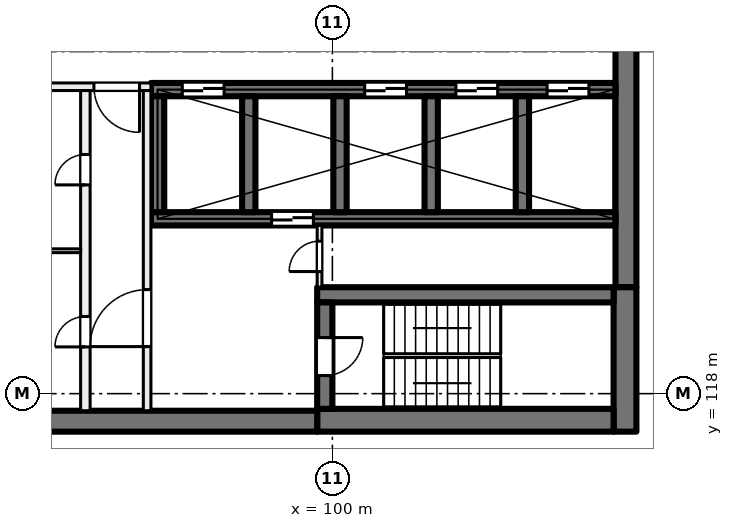
"""IFC4 building model, lengths in metres.
Left out: names, types, materials, properties, quantities, classifications, styles, units other than length and angle.
Written with IfcOpenShell. Run it as: python <this file> out.ifc"""

import sys

from ifc_helpers import new_model, si_unit, direction, frame, frame_2d, origin, place, context, subcontext, project, spatial, rectangle, extrude, element, fill, save


model = new_model("IFC4")
c1 = context("Model", 3, precision=1e-05, world=origin(), true_north=direction((0.0, 1.0)))
c2 = subcontext(c1, "Body", "Model", "MODEL_VIEW")
j1 = project(units=[si_unit("LENGTHUNIT", "METRE"), si_unit("PLANEANGLEUNIT", "RADIAN")], contexts=[c1])
p1 = place(None, origin())
s1 = spatial("IfcSite", under=j1, at=p1, CompositionType="ELEMENT")
p2 = place(p1, origin())
s2 = spatial("IfcBuilding", under=s1, at=p2, CompositionType="ELEMENT")
p3 = place(p2, frame((0.0, 0.0, 166.5)))
s3 = spatial("IfcBuildingStorey", under=s2, at=p3, CompositionType="ELEMENT", Elevation=166.5)
p4 = place(p3, frame((107.725, 135.2, 0.0), z_axis=(0.0, 0.0, 1.0), x_axis=(0.0, -1.0, 0.0)))
e1 = element("IfcWall", 1, at=p4, inside=s3, PredefinedType="SHEAR", context=c2, shape_type="SweptSolid", body=[
    extrude(rectangle(XDim=14.4, YDim=0.55, at=frame_2d((7.2, 0.0))), origin(), (0.0, 0.0, 1.0), 4.0),
])
p5 = place(p3, frame((107.7, 120.8, 0.0), z_axis=(0.0, 0.0, 1.0), x_axis=(0.0, -1.0, 0.0)))
e2 = element("IfcWall", 2, at=p5, inside=s3, PredefinedType="SHEAR", context=c2, shape_type="SweptSolid", body=[
    extrude(rectangle(XDim=3.8, YDim=0.6, at=frame_2d((1.9, 0.0))), origin(), (0.0, 0.0, 1.0), 4.0),
])
p6 = place(p3, frame((107.4, 117.3, 0.0), z_axis=(0.0, 0.0, 1.0), x_axis=(-1.0, 0.0, 0.0)))
e3 = element("IfcWall", 3, at=p6, inside=s3, PredefinedType="SHEAR", context=c2, shape_type="SweptSolid", body=[
    extrude(rectangle(XDim=7.8, YDim=0.6, at=frame_2d((3.9, 0.0))), origin(), (0.0, 0.0, 1.0), 4.0),
])
p7 = place(p3, frame((99.6, 117.275, 0.0), z_axis=(0.0, 0.0, 1.0), x_axis=(-1.0, 0.0, 0.0)))
e4 = element("IfcWall", 4, at=p7, inside=s3, PredefinedType="SHEAR", context=c2, shape_type="SweptSolid", body=[
    extrude(rectangle(XDim=8.95, YDim=0.55, at=frame_2d((4.475, 0.0))), origin(), (0.0, 0.0, 1.0), 4.0),
])
p8 = place(p3, frame((107.4, 120.6, 0.0), z_axis=(0.0, 0.0, 1.0), x_axis=(-1.0, 0.0, 0.0)))
e5 = element("IfcWall", 5, at=p8, inside=s3, PredefinedType="SHEAR", context=c2, shape_type="SweptSolid", body=[
    extrude(rectangle(XDim=7.8, YDim=0.4, at=frame_2d((3.9, 0.0))), origin(), (0.0, 0.0, 1.0), 4.0),
])
p9 = place(p3, frame((99.8, 120.4, 0.0), z_axis=(0.0, 0.0, 1.0), x_axis=(0.0, -1.0, 0.0)))
e6 = element("IfcWall", 6, at=p9, inside=s3, PredefinedType="SHEAR", context=c2, shape_type="SweptSolid", body=[
    extrude(rectangle(XDim=2.8, YDim=0.4, at=frame_2d((1.4, 0.0))), origin(), (0.0, 0.0, 1.0), 4.0),
])
p10 = place(p9, frame((0.925, 0.0, 0.0)))
e7 = element("IfcOpeningElement", 7, at=p10, cuts=e6, PredefinedType="OPENING", context=c2, shape_type="SweptSolid", body=[
    extrude(rectangle(XDim=1.0, YDim=2.1, at=frame_2d((0.5, 1.05))), frame((0.0, 0.21, 0.0), z_axis=(0.0, -1.0, 0.0), x_axis=(1.0, 0.0, 0.0)), (0.0, 0.0, 1.0), 0.42),
])
p11 = place(p3, frame((107.45, 126.0, 0.0), z_axis=(0.0, 0.0, 1.0), x_axis=(-1.0, 0.0, 0.0)))
e8 = element("IfcWall", 8, at=p11, inside=s3, PredefinedType="SHEAR", context=c2, shape_type="SweptSolid", body=[
    extrude(rectangle(XDim=12.225, YDim=0.35, at=frame_2d((6.112, 0.0))), origin(), (0.0, 0.0, 1.0), 4.0),
])
p12 = place(p11, frame((0.7, 0.0, 0.0)))
e9 = element("IfcOpeningElement", 9, at=p12, cuts=e8, PredefinedType="OPENING", context=c2, shape_type="SweptSolid", body=[
    extrude(rectangle(XDim=1.1, YDim=2.1, at=frame_2d((0.55, 1.05))), frame((0.0, 0.185, 0.0), z_axis=(0.0, -1.0, 0.0), x_axis=(1.0, 0.0, 0.0)), (0.0, 0.0, 1.0), 0.37),
])
p13 = place(p11, frame((3.1, 0.0, 0.0)))
e10 = element("IfcOpeningElement", 10, at=p13, cuts=e8, PredefinedType="OPENING", context=c2, shape_type="SweptSolid", body=[
    extrude(rectangle(XDim=1.1, YDim=2.1, at=frame_2d((0.55, 1.05))), frame((0.0, 0.185, 0.0), z_axis=(0.0, -1.0, 0.0), x_axis=(1.0, 0.0, 0.0)), (0.0, 0.0, 1.0), 0.37),
])
p14 = place(p11, frame((5.5, 0.0, 0.0)))
e11 = element("IfcOpeningElement", 11, at=p14, cuts=e8, PredefinedType="OPENING", context=c2, shape_type="SweptSolid", body=[
    extrude(rectangle(XDim=1.1, YDim=2.1, at=frame_2d((0.55, 1.05))), frame((0.0, 0.185, 0.0), z_axis=(0.0, -1.0, 0.0), x_axis=(1.0, 0.0, 0.0)), (0.0, 0.0, 1.0), 0.37),
])
p15 = place(p11, frame((10.3, 0.0, 0.0)))
e12 = element("IfcOpeningElement", 12, at=p15, cuts=e8, PredefinedType="OPENING", context=c2, shape_type="SweptSolid", body=[
    extrude(rectangle(XDim=1.1, YDim=2.1, at=frame_2d((0.55, 1.05))), frame((0.0, 0.185, 0.0), z_axis=(0.0, -1.0, 0.0), x_axis=(1.0, 0.0, 0.0)), (0.0, 0.0, 1.0), 0.37),
])
p16 = place(p3, frame((107.45, 122.6, 0.0), z_axis=(0.0, 0.0, 1.0), x_axis=(-1.0, 0.0, 0.0)))
e13 = element("IfcWall", 13, at=p16, inside=s3, PredefinedType="SHEAR", context=c2, shape_type="SweptSolid", body=[
    extrude(rectangle(XDim=12.225, YDim=0.35, at=frame_2d((6.112, 0.0))), origin(), (0.0, 0.0, 1.0), 4.0),
])
p17 = place(p16, frame((7.95, 0.0, 0.0)))
e14 = element("IfcOpeningElement", 14, at=p17, cuts=e13, PredefinedType="OPENING", context=c2, shape_type="SweptSolid", body=[
    extrude(rectangle(XDim=1.1, YDim=2.1, at=frame_2d((0.55, 1.05))), frame((0.0, 0.185, 0.0), z_axis=(0.0, -1.0, 0.0), x_axis=(1.0, 0.0, 0.0)), (0.0, 0.0, 1.0), 0.37),
])
for number, where, z_axis, x_axis in (
    (15, (105.0, 125.825, 0.0), (0.0, 0.0, 1.0), (0.0, -1.0, 0.0)),
    (16, (102.6, 125.825, 0.0), (0.0, 0.0, 1.0), (0.0, -1.0, 0.0)),
    (17, (100.2, 125.825, 0.0), (0.0, 0.0, 1.0), (0.0, -1.0, 0.0)),
    (18, (97.8, 125.825, 0.0), (0.0, 0.0, 1.0), (0.0, -1.0, 0.0)),
    (19, (95.4, 125.825, 0.0), (0.0, 0.0, 1.0), (0.0, -1.0, 0.0)),
):
    element("IfcWall", number, at=place(p3, frame(where, z_axis=z_axis, x_axis=x_axis)), inside=s3, PredefinedType="SHEAR", context=c2, shape_type="SweptSolid", body=[
        extrude(rectangle(XDim=3.05, YDim=0.35, at=frame_2d((1.525, 0.0))), origin(), (0.0, 0.0, 1.0), 4.0),
    ])
p18 = place(p3, frame((95.225, 126.075, 0.0), z_axis=(0.0, 0.0, 1.0), x_axis=(-1.0, 0.0, 0.0)))
e20 = element("IfcWall", 20, at=p18, inside=s3, PredefinedType="PARTITIONING", context=c2, shape_type="SweptSolid", body=[
    extrude(rectangle(XDim=3.875, YDim=0.2, at=frame_2d((1.938, 0.0))), origin(), (0.0, 0.0, 1.0), 3.625),
])
p19 = place(p18, frame((0.3, 0.0, 0.0)))
e21 = element("IfcOpeningElement", 21, at=p19, cuts=e20, PredefinedType="OPENING", context=c2, shape_type="SweptSolid", body=[
    extrude(rectangle(XDim=1.2, YDim=2.1, at=frame_2d((0.6, 1.05))), frame((0.0, 0.11, 0.0), z_axis=(0.0, -1.0, 0.0), x_axis=(1.0, 0.0, 0.0)), (0.0, 0.0, 1.0), 0.22),
])
p20 = place(p3, frame((95.125, 117.55, 0.0), z_axis=(0.0, 0.0, 1.0), x_axis=(0.0, 1.0, 0.0)))
e22 = element("IfcWall", 22, at=p20, inside=s3, PredefinedType="PARTITIONING", context=c2, shape_type="SweptSolid", body=[
    extrude(rectangle(XDim=8.425, YDim=0.2, at=frame_2d((4.212, 0.0))), origin(), (0.0, 0.0, 1.0), 3.625),
])
p21 = place(p20, frame((1.688, 0.0, 0.0)))
e23 = element("IfcOpeningElement", 23, at=p21, cuts=e22, PredefinedType="OPENING", context=c2, shape_type="SweptSolid", body=[
    extrude(rectangle(XDim=1.5, YDim=2.1, at=frame_2d((0.75, 1.05))), frame((0.0, 0.11, 0.0), z_axis=(0.0, -1.0, 0.0), x_axis=(1.0, 0.0, 0.0)), (0.0, 0.0, 1.0), 0.22),
])
p22 = place(p3, frame((93.5, 117.55, 0.0), z_axis=(0.0, 0.0, 1.0), x_axis=(0.0, 1.0, 0.0)))
e24 = element("IfcWall", 24, at=p22, inside=s3, PredefinedType="PARTITIONING", context=c2, shape_type="SweptSolid", body=[
    extrude(rectangle(XDim=8.425, YDim=0.25, at=frame_2d((4.212, 0.0))), origin(), (0.0, 0.0, 1.0), 3.625),
])
p23 = place(p22, frame((5.942, 0.0, 0.0)))
e25 = element("IfcOpeningElement", 25, at=p23, cuts=e24, PredefinedType="OPENING", context=c2, shape_type="SweptSolid", body=[
    extrude(rectangle(XDim=0.8, YDim=2.1, at=frame_2d((0.4, 1.05))), frame((0.0, 0.135, 0.0), z_axis=(0.0, -1.0, 0.0), x_axis=(1.0, 0.0, 0.0)), (0.0, 0.0, 1.0), 0.27),
])
p24 = place(p22, frame((1.68, 0.0, 0.0)))
e26 = element("IfcOpeningElement", 26, at=p24, cuts=e24, PredefinedType="OPENING", context=c2, shape_type="SweptSolid", body=[
    extrude(rectangle(XDim=0.8, YDim=2.1, at=frame_2d((0.4, 1.05))), frame((0.0, 0.135, 0.0), z_axis=(0.0, -1.0, 0.0), x_axis=(1.0, 0.0, 0.0)), (0.0, 0.0, 1.0), 0.27),
])
p25 = place(p3, frame((99.663, 120.8, 0.0), z_axis=(0.0, 0.0, 1.0), x_axis=(0.0, 1.0, 0.0)))
e27 = element("IfcWall", 27, at=p25, inside=s3, PredefinedType="PARTITIONING", context=c2, shape_type="SweptSolid", body=[
    extrude(rectangle(XDim=1.625, YDim=0.125, at=frame_2d((0.812, 0.0))), origin(), (0.0, 0.0, 1.0), 3.625),
])
p26 = place(p25, frame((0.413, 0.0, 0.0)))
e28 = element("IfcOpeningElement", 28, at=p26, cuts=e27, PredefinedType="OPENING", context=c2, shape_type="SweptSolid", body=[
    extrude(rectangle(XDim=0.8, YDim=2.1, at=frame_2d((0.4, 1.05))), frame((0.0, 0.073, 0.0), z_axis=(0.0, -1.0, 0.0), x_axis=(1.0, 0.0, 0.0)), (0.0, 0.0, 1.0), 0.145),
])
p27 = place(p3, frame((93.375, 121.76, 0.0), z_axis=(0.0, 0.0, 1.0), x_axis=(-1.0, 0.0, 0.0)))
e29 = element("IfcWall", 29, at=p27, inside=s3, PredefinedType="PARTITIONING", context=c2, shape_type="SweptSolid", body=[
    extrude(rectangle(XDim=2.025, YDim=0.1, at=frame_2d((1.012, 0.0))), origin(), (0.0, 0.0, 1.0), 3.625),
])
p28 = place(p12, origin())
e30 = element("IfcDoor", 30, at=p28, inside=s3, OperationType="DOUBLE_DOOR_SLIDING", PredefinedType="DOOR", context=c2, shape_type="SweptSolid", body=[
    extrude(rectangle(XDim=1.1, YDim=2.1, at=frame_2d((0.55, 1.05))), frame((0.0, 0.025, 0.0), z_axis=(0.0, -1.0, 0.0), x_axis=(1.0, 0.0, 0.0)), (0.0, 0.0, 1.0), 0.05),
])
fill(e9, e30)
p29 = place(p13, origin())
e31 = element("IfcDoor", 31, at=p29, inside=s3, OperationType="DOUBLE_DOOR_SLIDING", PredefinedType="DOOR", context=c2, shape_type="SweptSolid", body=[
    extrude(rectangle(XDim=1.1, YDim=2.1, at=frame_2d((0.55, 1.05))), frame((0.0, 0.025, 0.0), z_axis=(0.0, -1.0, 0.0), x_axis=(1.0, 0.0, 0.0)), (0.0, 0.0, 1.0), 0.05),
])
fill(e10, e31)
p30 = place(p14, origin())
e32 = element("IfcDoor", 32, at=p30, inside=s3, OperationType="DOUBLE_DOOR_SLIDING", PredefinedType="DOOR", context=c2, shape_type="SweptSolid", body=[
    extrude(rectangle(XDim=1.1, YDim=2.1, at=frame_2d((0.55, 1.05))), frame((0.0, 0.025, 0.0), z_axis=(0.0, -1.0, 0.0), x_axis=(1.0, 0.0, 0.0)), (0.0, 0.0, 1.0), 0.05),
])
fill(e11, e32)
p31 = place(p15, origin())
e33 = element("IfcDoor", 33, at=p31, inside=s3, OperationType="DOUBLE_DOOR_SLIDING", PredefinedType="DOOR", context=c2, shape_type="SweptSolid", body=[
    extrude(rectangle(XDim=1.1, YDim=2.1, at=frame_2d((0.55, 1.05))), frame((0.0, 0.025, 0.0), z_axis=(0.0, -1.0, 0.0), x_axis=(1.0, 0.0, 0.0)), (0.0, 0.0, 1.0), 0.05),
])
fill(e12, e33)
p32 = place(p19, origin())
e34 = element("IfcDoor", 34, at=p32, inside=s3, OperationType="DOUBLE_DOOR_SINGLE_SWING", PredefinedType="DOOR", context=c2, shape_type="SweptSolid", body=[
    extrude(rectangle(XDim=1.2, YDim=2.1, at=frame_2d((0.6, 1.05))), frame((0.0, 0.025, 0.0), z_axis=(0.0, -1.0, 0.0), x_axis=(1.0, 0.0, 0.0)), (0.0, 0.0, 1.0), 0.05),
])
fill(e21, e34)
p33 = place(p21, origin())
e35 = element("IfcDoor", 35, at=p33, inside=s3, OperationType="DOUBLE_DOOR_SINGLE_SWING", PredefinedType="DOOR", context=c2, shape_type="SweptSolid", body=[
    extrude(rectangle(XDim=1.5, YDim=2.1, at=frame_2d((0.75, 1.05))), frame((0.0, 0.025, 0.0), z_axis=(0.0, -1.0, 0.0), x_axis=(1.0, 0.0, 0.0)), (0.0, 0.0, 1.0), 0.05),
])
fill(e23, e35)
p34 = place(p10, origin())
e36 = element("IfcDoor", 36, at=p34, inside=s3, OperationType="SINGLE_SWING_LEFT", PredefinedType="DOOR", context=c2, shape_type="SweptSolid", body=[
    extrude(rectangle(XDim=1.0, YDim=2.1, at=frame_2d((0.5, 1.05))), frame((0.0, 0.025, 0.0), z_axis=(0.0, -1.0, 0.0), x_axis=(1.0, 0.0, 0.0)), (0.0, 0.0, 1.0), 0.05),
])
fill(e7, e36)
p35 = place(p26, origin())
e37 = element("IfcDoor", 37, at=p35, inside=s3, OperationType="SINGLE_SWING_RIGHT", PredefinedType="DOOR", context=c2, shape_type="SweptSolid", body=[
    extrude(rectangle(XDim=0.8, YDim=2.1, at=frame_2d((0.4, 1.05))), frame((0.0, 0.025, 0.0), z_axis=(0.0, -1.0, 0.0), x_axis=(1.0, 0.0, 0.0)), (0.0, 0.0, 1.0), 0.05),
])
fill(e28, e37)
p36 = place(p23, origin())
e38 = element("IfcDoor", 38, at=p36, inside=s3, OperationType="SINGLE_SWING_LEFT", PredefinedType="DOOR", context=c2, shape_type="SweptSolid", body=[
    extrude(rectangle(XDim=0.8, YDim=2.1, at=frame_2d((0.4, 1.05))), frame((0.0, 0.025, 0.0), z_axis=(0.0, -1.0, 0.0), x_axis=(1.0, 0.0, 0.0)), (0.0, 0.0, 1.0), 0.05),
])
fill(e25, e38)
p37 = place(p24, origin())
e39 = element("IfcDoor", 39, at=p37, inside=s3, OperationType="SINGLE_SWING_RIGHT", PredefinedType="DOOR", context=c2, shape_type="SweptSolid", body=[
    extrude(rectangle(XDim=0.8, YDim=2.1, at=frame_2d((0.4, 1.05))), frame((0.0, 0.025, 0.0), z_axis=(0.0, -1.0, 0.0), x_axis=(1.0, 0.0, 0.0)), (0.0, 0.0, 1.0), 0.05),
])
fill(e26, e39)
p38 = place(p17, origin())
e40 = element("IfcDoor", 40, at=p38, inside=s3, OperationType="DOUBLE_DOOR_SLIDING", PredefinedType="DOOR", context=c2, shape_type="SweptSolid", body=[
    extrude(rectangle(XDim=1.1, YDim=2.1, at=frame_2d((0.55, 1.05))), frame((0.0, 0.025, 0.0), z_axis=(0.0, -1.0, 0.0), x_axis=(1.0, 0.0, 0.0)), (0.0, 0.0, 1.0), 0.05),
])
fill(e14, e40)
save(model, sys.argv[1])
